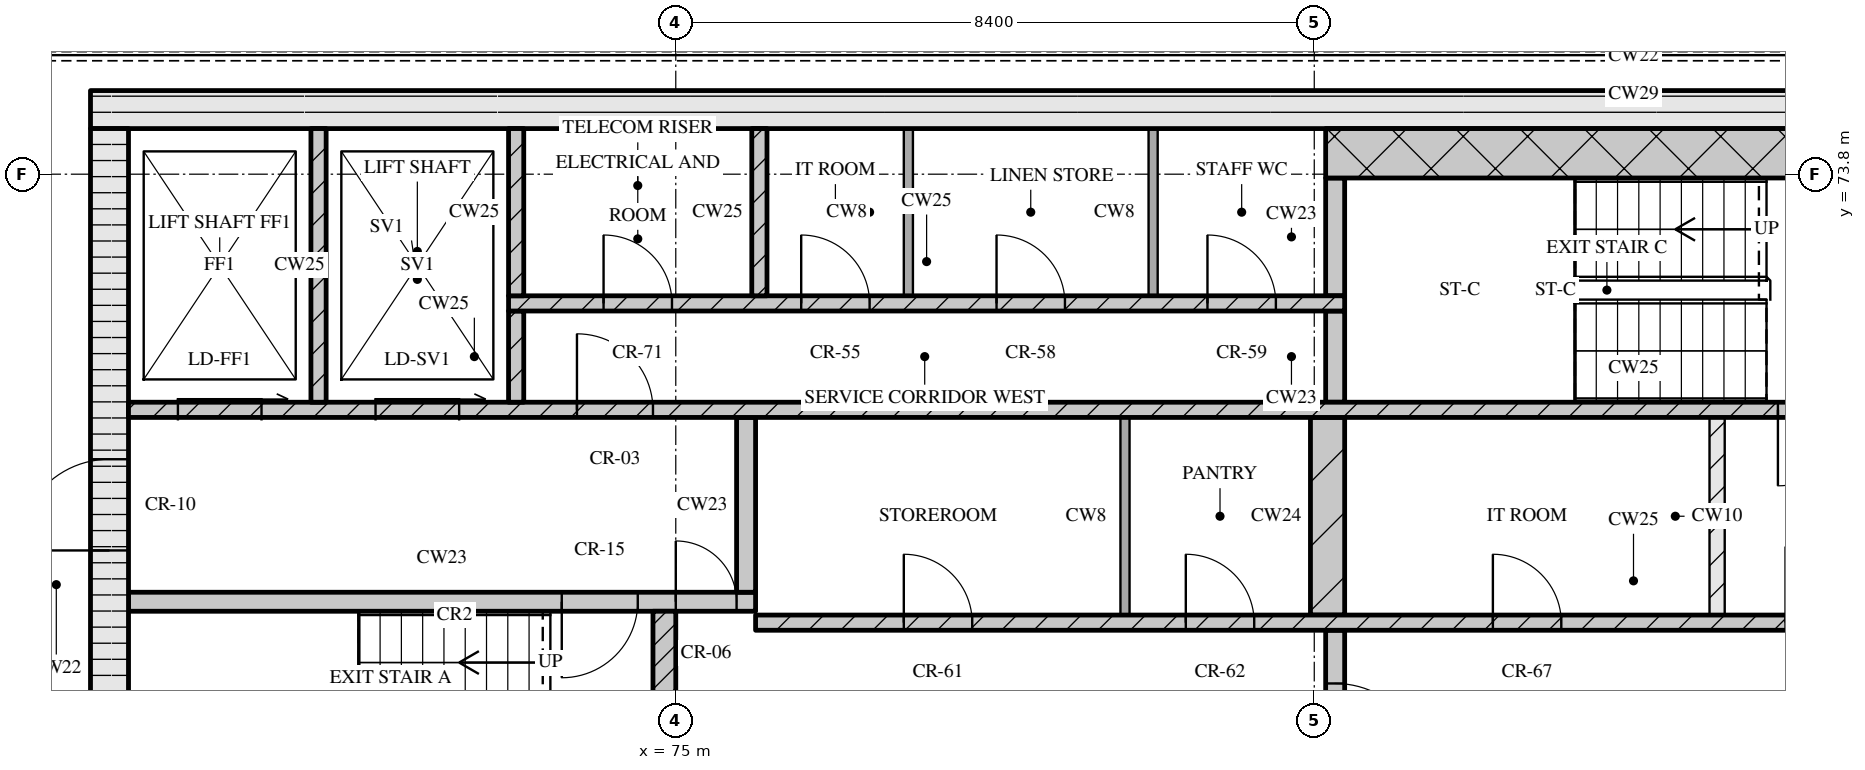
"""IFC4 building model, lengths in metres.
Left out: names, types, materials, properties, quantities, classifications, styles, units other than length and angle.
Written with IfcOpenShell. Run it as: python <this file> out.ifc"""

import sys

from ifc_helpers import new_model, si_unit, direction, frame, frame_2d, origin, place, context, subcontext, project, spatial, rectangle, extrude, element, fill, save


model = new_model("IFC4")
c1 = context("Model", 3, precision=1e-05, world=origin(), true_north=direction((0.0, 1.0)))
c2 = subcontext(c1, "Body", "Model", "MODEL_VIEW")
j1 = project(units=[si_unit("LENGTHUNIT", "METRE"), si_unit("PLANEANGLEUNIT", "RADIAN")], contexts=[c1])
p1 = place(None, origin())
s1 = spatial("IfcSite", under=j1, at=p1, CompositionType="ELEMENT")
p2 = place(p1, origin())
s2 = spatial("IfcBuilding", under=s1, at=p2, CompositionType="ELEMENT")
p3 = place(p2, frame((0.0, 0.0, 292.35)))
s3 = spatial("IfcBuildingStorey", under=s2, at=p3, CompositionType="ELEMENT", Elevation=292.35)
p4 = place(p3, frame((67.3, 74.65, 0.0), z_axis=(0.0, 0.0, 1.0), x_axis=(1.0, 0.0, 0.0)))
e1 = element("IfcWall", 1, at=p4, inside=s3, PredefinedType="SOLIDWALL", context=c2, shape_type="SweptSolid", body=[
    extrude(rectangle(XDim=40.6, YDim=0.5, at=frame_2d((20.3, 0.0))), origin(), (0.0, 0.0, 1.0), 3.32),
])
p5 = place(p3, frame((67.55, 62.4, 0.0), z_axis=(0.0, 0.0, 1.0), x_axis=(0.0, 1.0, 0.0)))
e2 = element("IfcWall", 2, at=p5, inside=s3, PredefinedType="SOLIDWALL", context=c2, shape_type="SweptSolid", body=[
    extrude(rectangle(XDim=12.0, YDim=0.5, at=frame_2d((6.0, 0.0))), origin(), (0.0, 0.0, 1.0), 3.32),
])
p6 = place(p5, frame((6.45, 0.0, 0.0)))
e3 = element("IfcOpeningElement", 3, at=p6, cuts=e2, PredefinedType="OPENING", context=c2, shape_type="SweptSolid", body=[
    extrude(rectangle(XDim=1.2, YDim=2.1, at=frame_2d((0.6, 1.05))), frame((0.0, 0.26, 0.0), z_axis=(0.0, -1.0, 0.0), x_axis=(1.0, 0.0, 0.0)), (0.0, 0.0, 1.0), 0.52),
])
p7 = place(p3, frame((74.85, 65.2, 0.0), z_axis=(0.0, 0.0, 1.0), x_axis=(0.0, 1.0, 0.0)))
e4 = element("IfcWall", 4, at=p7, inside=s3, PredefinedType="SOLIDWALL", context=c2, shape_type="SweptSolid", body=[
    extrude(rectangle(XDim=2.85, YDim=0.3, at=frame_2d((1.425, 0.0))), origin(), (0.0, 0.0, 1.0), 3.32),
])
p8 = place(p3, frame((83.675, 65.2, 0.0), z_axis=(0.0, 0.0, 1.0), x_axis=(0.0, 1.0, 0.0)))
e5 = element("IfcWall", 5, at=p8, inside=s3, PredefinedType="SOLIDWALL", context=c2, shape_type="SweptSolid", body=[
    extrude(rectangle(XDim=2.6, YDim=0.25, at=frame_2d((1.3, 0.0))), origin(), (0.0, 0.0, 1.0), 3.32),
])
p9 = place(p8, frame((0.7, 0.0, 0.0)))
e6 = element("IfcOpeningElement", 6, at=p9, cuts=e5, PredefinedType="OPENING", context=c2, shape_type="SweptSolid", body=[
    extrude(rectangle(XDim=1.2, YDim=2.1, at=frame_2d((0.6, 1.05))), frame((0.0, 0.135, 0.0), z_axis=(0.0, -1.0, 0.0), x_axis=(1.0, 0.0, 0.0)), (0.0, 0.0, 1.0), 0.27),
])
p10 = place(p3, frame((76.05, 67.9, 0.0), z_axis=(0.0, 0.0, 1.0), x_axis=(1.0, 0.0, 0.0)))
e7 = element("IfcWall", 7, at=p10, inside=s3, PredefinedType="SOLIDWALL", context=c2, shape_type="SweptSolid", body=[
    extrude(rectangle(XDim=23.1, YDim=0.2, at=frame_2d((11.55, 0.0))), origin(), (0.0, 0.0, 1.0), 3.32),
])
p11 = place(p10, frame((1.95, 0.0, 0.0)))
e8 = element("IfcOpeningElement", 8, at=p11, cuts=e7, PredefinedType="OPENING", context=c2, shape_type="SweptSolid", body=[
    extrude(rectangle(XDim=0.9, YDim=2.1, at=frame_2d((0.45, 1.05))), frame((0.0, 0.11, 0.0), z_axis=(0.0, -1.0, 0.0), x_axis=(1.0, 0.0, 0.0)), (0.0, 0.0, 1.0), 0.22),
])
p12 = place(p10, frame((5.66, 0.0, 0.0)))
e9 = element("IfcOpeningElement", 9, at=p12, cuts=e7, PredefinedType="OPENING", context=c2, shape_type="SweptSolid", body=[
    extrude(rectangle(XDim=0.9, YDim=2.1, at=frame_2d((0.45, 1.05))), frame((0.0, 0.11, 0.0), z_axis=(0.0, -1.0, 0.0), x_axis=(1.0, 0.0, 0.0)), (0.0, 0.0, 1.0), 0.22),
])
p13 = place(p10, frame((9.7, 0.0, 0.0)))
e10 = element("IfcOpeningElement", 10, at=p13, cuts=e7, PredefinedType="OPENING", context=c2, shape_type="SweptSolid", body=[
    extrude(rectangle(XDim=0.9, YDim=2.1, at=frame_2d((0.45, 1.05))), frame((0.0, 0.11, 0.0), z_axis=(0.0, -1.0, 0.0), x_axis=(1.0, 0.0, 0.0)), (0.0, 0.0, 1.0), 0.22),
])
p14 = place(p10, frame((13.55, 0.0, 0.0)))
e11 = element("IfcOpeningElement", 11, at=p14, cuts=e7, PredefinedType="OPENING", context=c2, shape_type="SweptSolid", body=[
    extrude(rectangle(XDim=1.0, YDim=2.1, at=frame_2d((0.5, 1.05))), frame((0.0, 0.11, 0.0), z_axis=(0.0, -1.0, 0.0), x_axis=(1.0, 0.0, 0.0)), (0.0, 0.0, 1.0), 0.22),
])
p15 = place(p10, frame((16.2, 0.0, 0.0)))
e12 = element("IfcOpeningElement", 12, at=p15, cuts=e7, PredefinedType="OPENING", context=c2, shape_type="SweptSolid", body=[
    extrude(rectangle(XDim=1.1, YDim=2.1, at=frame_2d((0.55, 1.05))), frame((0.0, 0.11, 0.0), z_axis=(0.0, -1.0, 0.0), x_axis=(1.0, 0.0, 0.0)), (0.0, 0.0, 1.0), 0.22),
])
p16 = place(p10, frame((18.7, 0.0, 0.0)))
e13 = element("IfcOpeningElement", 13, at=p16, cuts=e7, PredefinedType="OPENING", context=c2, shape_type="SweptSolid", body=[
    extrude(rectangle(XDim=1.1, YDim=2.1, at=frame_2d((0.55, 1.05))), frame((0.0, 0.11, 0.0), z_axis=(0.0, -1.0, 0.0), x_axis=(1.0, 0.0, 0.0)), (0.0, 0.0, 1.0), 0.22),
])
p17 = place(p10, frame((21.2, 0.0, 0.0)))
e14 = element("IfcOpeningElement", 14, at=p17, cuts=e7, PredefinedType="OPENING", context=c2, shape_type="SweptSolid", body=[
    extrude(rectangle(XDim=1.1, YDim=2.1, at=frame_2d((0.55, 1.05))), frame((0.0, 0.11, 0.0), z_axis=(0.0, -1.0, 0.0), x_axis=(1.0, 0.0, 0.0)), (0.0, 0.0, 1.0), 0.22),
])
p18 = place(p3, frame((80.91, 68.0, 0.0), z_axis=(0.0, 0.0, 1.0), x_axis=(0.0, 1.0, 0.0)))
e15 = element("IfcWall", 15, at=p18, inside=s3, PredefinedType="PARTITIONING", context=c2, shape_type="SweptSolid", body=[
    extrude(rectangle(XDim=2.6, YDim=0.12, at=frame_2d((1.3, 0.0))), origin(), (0.0, 0.0, 1.0), 3.32),
])
p19 = place(p3, frame((83.575, 68.0, 0.0), z_axis=(0.0, 0.0, 1.0), x_axis=(0.0, 1.0, 0.0)))
e16 = element("IfcWall", 16, at=p19, inside=s3, PredefinedType="SOLIDWALL", context=c2, shape_type="SweptSolid", body=[
    extrude(rectangle(XDim=2.6, YDim=0.45, at=frame_2d((1.3, 0.0))), origin(), (0.0, 0.0, 1.0), 3.32),
])
p20 = place(p3, frame((88.7, 68.0, 0.0), z_axis=(0.0, 0.0, 1.0), x_axis=(0.0, 1.0, 0.0)))
e17 = element("IfcWall", 17, at=p20, inside=s3, PredefinedType="PARTITIONING", context=c2, shape_type="SweptSolid", body=[
    extrude(rectangle(XDim=2.6, YDim=0.2, at=frame_2d((1.3, 0.0))), origin(), (0.0, 0.0, 1.0), 3.32),
])
p21 = place(p3, frame((67.8, 68.175, 0.0), z_axis=(0.0, 0.0, 1.0), x_axis=(1.0, 0.0, 0.0)))
e18 = element("IfcWall", 18, at=p21, inside=s3, PredefinedType="SOLIDWALL", context=c2, shape_type="SweptSolid", body=[
    extrude(rectangle(XDim=8.25, YDim=0.25, at=frame_2d((4.125, 0.0))), origin(), (0.0, 0.0, 1.0), 3.32),
])
p22 = place(p21, frame((5.7, 0.0, 0.0)))
e19 = element("IfcOpeningElement", 19, at=p22, cuts=e18, PredefinedType="OPENING", context=c2, shape_type="SweptSolid", body=[
    extrude(rectangle(XDim=1.0, YDim=2.1, at=frame_2d((0.5, 1.05))), frame((0.0, 0.135, 0.0), z_axis=(0.0, -1.0, 0.0), x_axis=(1.0, 0.0, 0.0)), (0.0, 0.0, 1.0), 0.27),
])
p23 = place(p21, frame((7.2, 0.0, 0.0)))
e20 = element("IfcOpeningElement", 20, at=p23, cuts=e18, PredefinedType="OPENING", context=c2, shape_type="SweptSolid", body=[
    extrude(rectangle(XDim=0.8, YDim=2.1, at=frame_2d((0.4, 1.05))), frame((0.0, 0.135, 0.0), z_axis=(0.0, -1.0, 0.0), x_axis=(1.0, 0.0, 0.0)), (0.0, 0.0, 1.0), 0.27),
])
p24 = place(p3, frame((75.925, 68.3, 0.0), z_axis=(0.0, 0.0, 1.0), x_axis=(0.0, 1.0, 0.0)))
e21 = element("IfcWall", 21, at=p24, inside=s3, PredefinedType="SOLIDWALL", context=c2, shape_type="SweptSolid", body=[
    extrude(rectangle(XDim=2.3, YDim=0.25, at=frame_2d((1.15, 0.0))), origin(), (0.0, 0.0, 1.0), 3.32),
])
p25 = place(p3, frame((67.8, 70.7, 0.0), z_axis=(0.0, 0.0, 1.0), x_axis=(1.0, 0.0, 0.0)))
e22 = element("IfcWall", 22, at=p25, inside=s3, PredefinedType="SOLIDWALL", context=c2, shape_type="SweptSolid", body=[
    extrude(rectangle(XDim=39.6, YDim=0.2, at=frame_2d((19.8, 0.0))), origin(), (0.0, 0.0, 1.0), 3.32),
])
p26 = place(p25, frame((0.65, 0.0, 0.0)))
e23 = element("IfcOpeningElement", 23, at=p26, cuts=e22, PredefinedType="OPENING", context=c2, shape_type="SweptSolid", body=[
    extrude(rectangle(XDim=1.1, YDim=2.1, at=frame_2d((0.55, 1.05))), frame((0.0, 0.11, 0.0), z_axis=(0.0, -1.0, 0.0), x_axis=(1.0, 0.0, 0.0)), (0.0, 0.0, 1.0), 0.22),
])
p27 = place(p25, frame((3.25, 0.0, 0.0)))
e24 = element("IfcOpeningElement", 24, at=p27, cuts=e22, PredefinedType="OPENING", context=c2, shape_type="SweptSolid", body=[
    extrude(rectangle(XDim=1.1, YDim=2.1, at=frame_2d((0.55, 1.05))), frame((0.0, 0.11, 0.0), z_axis=(0.0, -1.0, 0.0), x_axis=(1.0, 0.0, 0.0)), (0.0, 0.0, 1.0), 0.22),
])
p28 = place(p25, frame((5.9, 0.0, 0.0)))
e25 = element("IfcOpeningElement", 25, at=p28, cuts=e22, PredefinedType="OPENING", context=c2, shape_type="SweptSolid", body=[
    extrude(rectangle(XDim=1.0, YDim=2.1, at=frame_2d((0.5, 1.05))), frame((0.0, 0.11, 0.0), z_axis=(0.0, -1.0, 0.0), x_axis=(1.0, 0.0, 0.0)), (0.0, 0.0, 1.0), 0.22),
])
p29 = place(p25, frame((21.7, 0.0, 0.0)))
e26 = element("IfcOpeningElement", 26, at=p29, cuts=e22, PredefinedType="OPENING", context=c2, shape_type="SweptSolid", body=[
    extrude(rectangle(XDim=1.0, YDim=2.1, at=frame_2d((0.5, 1.05))), frame((0.0, 0.11, 0.0), z_axis=(0.0, -1.0, 0.0), x_axis=(1.0, 0.0, 0.0)), (0.0, 0.0, 1.0), 0.22),
])
p30 = place(p25, frame((32.7, 0.0, 0.0)))
e27 = element("IfcOpeningElement", 27, at=p30, cuts=e22, PredefinedType="OPENING", context=c2, shape_type="SweptSolid", body=[
    extrude(rectangle(XDim=1.0, YDim=2.1, at=frame_2d((0.5, 1.05))), frame((0.0, 0.11, 0.0), z_axis=(0.0, -1.0, 0.0), x_axis=(1.0, 0.0, 0.0)), (0.0, 0.0, 1.0), 0.22),
])
p31 = place(p25, frame((35.25, 0.0, 0.0)))
e28 = element("IfcOpeningElement", 28, at=p31, cuts=e22, PredefinedType="OPENING", context=c2, shape_type="SweptSolid", body=[
    extrude(rectangle(XDim=1.1, YDim=2.1, at=frame_2d((0.55, 1.05))), frame((0.0, 0.11, 0.0), z_axis=(0.0, -1.0, 0.0), x_axis=(1.0, 0.0, 0.0)), (0.0, 0.0, 1.0), 0.22),
])
p32 = place(p25, frame((37.85, 0.0, 0.0)))
e29 = element("IfcOpeningElement", 29, at=p32, cuts=e22, PredefinedType="OPENING", context=c2, shape_type="SweptSolid", body=[
    extrude(rectangle(XDim=1.1, YDim=2.1, at=frame_2d((0.55, 1.05))), frame((0.0, 0.11, 0.0), z_axis=(0.0, -1.0, 0.0), x_axis=(1.0, 0.0, 0.0)), (0.0, 0.0, 1.0), 0.22),
])
p33 = place(p3, frame((70.3, 70.8, 0.0), z_axis=(0.0, 0.0, 1.0), x_axis=(0.0, 1.0, 0.0)))
e30 = element("IfcWall", 30, at=p33, inside=s3, PredefinedType="SOLIDWALL", context=c2, shape_type="SweptSolid", body=[
    extrude(rectangle(XDim=3.6, YDim=0.2, at=frame_2d((1.8, 0.0))), origin(), (0.0, 0.0, 1.0), 3.32),
])
p34 = place(p3, frame((72.9, 70.8, 0.0), z_axis=(0.0, 0.0, 1.0), x_axis=(0.0, 1.0, 0.0)))
e31 = element("IfcWall", 31, at=p34, inside=s3, PredefinedType="SOLIDWALL", context=c2, shape_type="SweptSolid", body=[
    extrude(rectangle(XDim=1.2, YDim=0.2, at=frame_2d((0.6, 0.0))), origin(), (0.0, 0.0, 1.0), 3.32),
])
p35 = place(p3, frame((83.675, 70.8, 0.0), z_axis=(0.0, 0.0, 1.0), x_axis=(0.0, 1.0, 0.0)))
e32 = element("IfcWall", 32, at=p35, inside=s3, PredefinedType="SOLIDWALL", context=c2, shape_type="SweptSolid", body=[
    extrude(rectangle(XDim=1.2, YDim=0.25, at=frame_2d((0.6, 0.0))), origin(), (0.0, 0.0, 1.0), 3.32),
])
p36 = place(p3, frame((72.8, 72.1, 0.0), z_axis=(0.0, 0.0, 1.0), x_axis=(1.0, 0.0, 0.0)))
e33 = element("IfcWall", 33, at=p36, inside=s3, PredefinedType="SOLIDWALL", context=c2, shape_type="SweptSolid", body=[
    extrude(rectangle(XDim=11.0, YDim=0.2, at=frame_2d((5.5, 0.0))), origin(), (0.0, 0.0, 1.0), 3.32),
])
p37 = place(p36, frame((1.25, 0.0, 0.0)))
e34 = element("IfcOpeningElement", 34, at=p37, cuts=e33, PredefinedType="OPENING", context=c2, shape_type="SweptSolid", body=[
    extrude(rectangle(XDim=0.9, YDim=2.1, at=frame_2d((0.45, 1.05))), frame((0.0, 0.11, 0.0), z_axis=(0.0, -1.0, 0.0), x_axis=(1.0, 0.0, 0.0)), (0.0, 0.0, 1.0), 0.22),
])
p38 = place(p36, frame((3.85, 0.0, 0.0)))
e35 = element("IfcOpeningElement", 35, at=p38, cuts=e33, PredefinedType="OPENING", context=c2, shape_type="SweptSolid", body=[
    extrude(rectangle(XDim=0.9, YDim=2.1, at=frame_2d((0.45, 1.05))), frame((0.0, 0.11, 0.0), z_axis=(0.0, -1.0, 0.0), x_axis=(1.0, 0.0, 0.0)), (0.0, 0.0, 1.0), 0.22),
])
p39 = place(p36, frame((6.42, 0.0, 0.0)))
e36 = element("IfcOpeningElement", 36, at=p39, cuts=e33, PredefinedType="OPENING", context=c2, shape_type="SweptSolid", body=[
    extrude(rectangle(XDim=0.9, YDim=2.1, at=frame_2d((0.45, 1.05))), frame((0.0, 0.11, 0.0), z_axis=(0.0, -1.0, 0.0), x_axis=(1.0, 0.0, 0.0)), (0.0, 0.0, 1.0), 0.22),
])
p40 = place(p36, frame((9.195, 0.0, 0.0)))
e37 = element("IfcOpeningElement", 37, at=p40, cuts=e33, PredefinedType="OPENING", context=c2, shape_type="SweptSolid", body=[
    extrude(rectangle(XDim=0.9, YDim=2.1, at=frame_2d((0.45, 1.05))), frame((0.0, 0.11, 0.0), z_axis=(0.0, -1.0, 0.0), x_axis=(1.0, 0.0, 0.0)), (0.0, 0.0, 1.0), 0.22),
])
for number, where, z_axis, x_axis in (
    (38, (72.9, 72.2, 0.0), (0.0, 0.0, 1.0), (0.0, 1.0, 0.0)),
    (39, (76.1, 72.2, 0.0), (0.0, 0.0, 1.0), (0.0, 1.0, 0.0)),
):
    element("IfcWall", number, at=place(p3, frame(where, z_axis=z_axis, x_axis=x_axis)), inside=s3, PredefinedType="SOLIDWALL", context=c2, shape_type="SweptSolid", body=[
        extrude(rectangle(XDim=2.2, YDim=0.2, at=frame_2d((1.1, 0.0))), origin(), (0.0, 0.0, 1.0), 3.32),
    ])
for number, where, z_axis, x_axis in (
    (40, (78.06, 72.2, 0.0), (0.0, 0.0, 1.0), (0.0, 1.0, 0.0)),
    (41, (81.28, 72.2, 0.0), (0.0, 0.0, 1.0), (0.0, 1.0, 0.0)),
):
    element("IfcWall", number, at=place(p3, frame(where, z_axis=z_axis, x_axis=x_axis)), inside=s3, PredefinedType="PARTITIONING", context=c2, shape_type="SweptSolid", body=[
        extrude(rectangle(XDim=2.2, YDim=0.12, at=frame_2d((1.1, 0.0))), origin(), (0.0, 0.0, 1.0), 3.32),
    ])
p41 = place(p3, frame((83.675, 72.2, 0.0), z_axis=(0.0, 0.0, 1.0), x_axis=(0.0, 1.0, 0.0)))
e42 = element("IfcWall", 42, at=p41, inside=s3, PredefinedType="SOLIDWALL", context=c2, shape_type="SweptSolid", body=[
    extrude(rectangle(XDim=1.55, YDim=0.25, at=frame_2d((0.775, 0.0))), origin(), (0.0, 0.0, 1.0), 3.32),
])
p42 = place(p3, frame((83.55, 74.075, 0.0), z_axis=(0.0, 0.0, 1.0), x_axis=(1.0, 0.0, 0.0)))
e43 = element("IfcWall", 43, at=p42, inside=s3, PredefinedType="SOLIDWALL", context=c2, shape_type="SweptSolid", body=[
    extrude(rectangle(XDim=8.1, YDim=0.65, at=frame_2d((4.05, 0.0))), origin(), (0.0, 0.0, 1.0), 3.32),
])
p43 = place(p9, origin())
e44 = element("IfcDoor", 44, at=p43, inside=s3, OperationType="SINGLE_SWING_RIGHT", PredefinedType="DOOR", context=c2, shape_type="SweptSolid", body=[
    extrude(rectangle(XDim=1.2, YDim=2.1, at=frame_2d((0.6, 1.05))), frame((0.0, 0.025, 0.0), z_axis=(0.0, -1.0, 0.0), x_axis=(1.0, 0.0, 0.0)), (0.0, 0.0, 1.0), 0.05),
])
fill(e6, e44)
p44 = place(p11, origin())
e45 = element("IfcDoor", 45, at=p44, inside=s3, OperationType="SINGLE_SWING_LEFT", PredefinedType="DOOR", context=c2, shape_type="SweptSolid", body=[
    extrude(rectangle(XDim=0.9, YDim=2.1, at=frame_2d((0.45, 1.05))), frame((0.0, 0.025, 0.0), z_axis=(0.0, -1.0, 0.0), x_axis=(1.0, 0.0, 0.0)), (0.0, 0.0, 1.0), 0.05),
])
fill(e8, e45)
p45 = place(p12, origin())
e46 = element("IfcDoor", 46, at=p45, inside=s3, OperationType="SINGLE_SWING_LEFT", PredefinedType="DOOR", context=c2, shape_type="SweptSolid", body=[
    extrude(rectangle(XDim=0.9, YDim=2.1, at=frame_2d((0.45, 1.05))), frame((0.0, 0.025, 0.0), z_axis=(0.0, -1.0, 0.0), x_axis=(1.0, 0.0, 0.0)), (0.0, 0.0, 1.0), 0.05),
])
fill(e9, e46)
p46 = place(p13, origin())
e47 = element("IfcDoor", 47, at=p46, inside=s3, OperationType="SINGLE_SWING_LEFT", PredefinedType="DOOR", context=c2, shape_type="SweptSolid", body=[
    extrude(rectangle(XDim=0.9, YDim=2.1, at=frame_2d((0.45, 1.05))), frame((0.0, 0.025, 0.0), z_axis=(0.0, -1.0, 0.0), x_axis=(1.0, 0.0, 0.0)), (0.0, 0.0, 1.0), 0.05),
])
fill(e10, e47)
p47 = place(p22, origin())
e48 = element("IfcDoor", 48, at=p47, inside=s3, OperationType="SINGLE_SWING_RIGHT", PredefinedType="DOOR", context=c2, shape_type="SweptSolid", body=[
    extrude(rectangle(XDim=1.0, YDim=2.1, at=frame_2d((0.5, 1.05))), frame((0.0, 0.025, 0.0), z_axis=(0.0, -1.0, 0.0), x_axis=(1.0, 0.0, 0.0)), (0.0, 0.0, 1.0), 0.05),
])
fill(e19, e48)
p48 = place(p23, origin())
e49 = element("IfcDoor", 49, at=p48, inside=s3, OperationType="SINGLE_SWING_LEFT", PredefinedType="DOOR", context=c2, shape_type="SweptSolid", body=[
    extrude(rectangle(XDim=0.8, YDim=2.1, at=frame_2d((0.4, 1.05))), frame((0.0, 0.025, 0.0), z_axis=(0.0, -1.0, 0.0), x_axis=(1.0, 0.0, 0.0)), (0.0, 0.0, 1.0), 0.05),
])
fill(e20, e49)
p49 = place(p6, origin())
e50 = element("IfcDoor", 50, at=p49, inside=s3, OperationType="SINGLE_SWING_LEFT", PredefinedType="DOOR", context=c2, shape_type="SweptSolid", body=[
    extrude(rectangle(XDim=1.2, YDim=2.1, at=frame_2d((0.6, 1.05))), frame((0.0, 0.025, 0.0), z_axis=(0.0, -1.0, 0.0), x_axis=(1.0, 0.0, 0.0)), (0.0, 0.0, 1.0), 0.05),
])
fill(e3, e50)
p50 = place(p26, origin())
e51 = element("IfcDoor", 51, at=p50, inside=s3, OperationType="SLIDING_TO_RIGHT", PredefinedType="DOOR", context=c2, shape_type="SweptSolid", body=[
    extrude(rectangle(XDim=1.1, YDim=2.1, at=frame_2d((0.55, 1.05))), frame((0.0, 0.025, 0.0), z_axis=(0.0, -1.0, 0.0), x_axis=(1.0, 0.0, 0.0)), (0.0, 0.0, 1.0), 0.05),
])
fill(e23, e51)
p51 = place(p27, origin())
e52 = element("IfcDoor", 52, at=p51, inside=s3, OperationType="SLIDING_TO_RIGHT", PredefinedType="DOOR", context=c2, shape_type="SweptSolid", body=[
    extrude(rectangle(XDim=1.1, YDim=2.1, at=frame_2d((0.55, 1.05))), frame((0.0, 0.025, 0.0), z_axis=(0.0, -1.0, 0.0), x_axis=(1.0, 0.0, 0.0)), (0.0, 0.0, 1.0), 0.05),
])
fill(e24, e52)
p52 = place(p28, origin())
e53 = element("IfcDoor", 53, at=p52, inside=s3, OperationType="SINGLE_SWING_LEFT", PredefinedType="DOOR", context=c2, shape_type="SweptSolid", body=[
    extrude(rectangle(XDim=1.0, YDim=2.1, at=frame_2d((0.5, 1.05))), frame((0.0, 0.025, 0.0), z_axis=(0.0, -1.0, 0.0), x_axis=(1.0, 0.0, 0.0)), (0.0, 0.0, 1.0), 0.05),
])
fill(e25, e53)
p53 = place(p29, origin())
e54 = element("IfcDoor", 54, at=p53, inside=s3, OperationType="SINGLE_SWING_RIGHT", PredefinedType="DOOR", context=c2, shape_type="SweptSolid", body=[
    extrude(rectangle(XDim=1.0, YDim=2.1, at=frame_2d((0.5, 1.05))), frame((0.0, 0.025, 0.0), z_axis=(0.0, -1.0, 0.0), x_axis=(1.0, 0.0, 0.0)), (0.0, 0.0, 1.0), 0.05),
])
fill(e26, e54)
p54 = place(p37, origin())
e55 = element("IfcDoor", 55, at=p54, inside=s3, OperationType="SINGLE_SWING_LEFT", PredefinedType="DOOR", context=c2, shape_type="SweptSolid", body=[
    extrude(rectangle(XDim=0.9, YDim=2.1, at=frame_2d((0.45, 1.05))), frame((0.0, 0.025, 0.0), z_axis=(0.0, -1.0, 0.0), x_axis=(1.0, 0.0, 0.0)), (0.0, 0.0, 1.0), 0.05),
])
fill(e34, e55)
p55 = place(p38, origin())
e56 = element("IfcDoor", 56, at=p55, inside=s3, OperationType="SINGLE_SWING_LEFT", PredefinedType="DOOR", context=c2, shape_type="SweptSolid", body=[
    extrude(rectangle(XDim=0.9, YDim=2.1, at=frame_2d((0.45, 1.05))), frame((0.0, 0.025, 0.0), z_axis=(0.0, -1.0, 0.0), x_axis=(1.0, 0.0, 0.0)), (0.0, 0.0, 1.0), 0.05),
])
fill(e35, e56)
p56 = place(p39, origin())
e57 = element("IfcDoor", 57, at=p56, inside=s3, OperationType="SINGLE_SWING_LEFT", PredefinedType="DOOR", context=c2, shape_type="SweptSolid", body=[
    extrude(rectangle(XDim=0.9, YDim=2.1, at=frame_2d((0.45, 1.05))), frame((0.0, 0.025, 0.0), z_axis=(0.0, -1.0, 0.0), x_axis=(1.0, 0.0, 0.0)), (0.0, 0.0, 1.0), 0.05),
])
fill(e36, e57)
p57 = place(p40, origin())
e58 = element("IfcDoor", 58, at=p57, inside=s3, OperationType="SINGLE_SWING_LEFT", PredefinedType="DOOR", context=c2, shape_type="SweptSolid", body=[
    extrude(rectangle(XDim=0.9, YDim=2.1, at=frame_2d((0.45, 1.05))), frame((0.0, 0.025, 0.0), z_axis=(0.0, -1.0, 0.0), x_axis=(1.0, 0.0, 0.0)), (0.0, 0.0, 1.0), 0.05),
])
fill(e37, e58)
save(model, sys.argv[1])
